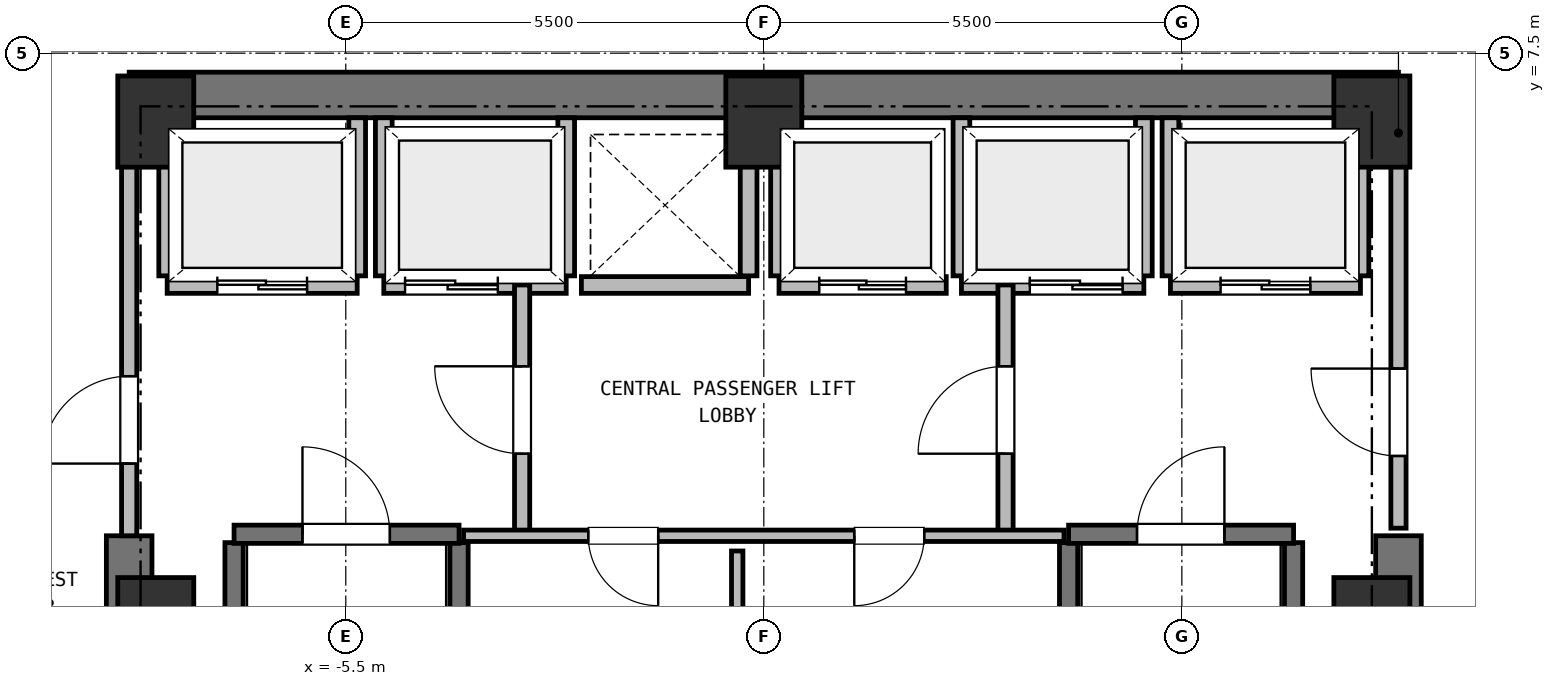
"""IFC4 building model, lengths in metres.
Left out: names, types, materials, properties, quantities, classifications, styles, units other than length and angle.
Written with IfcOpenShell. Run it as: python <this file> out.ifc"""

import sys

from ifc_helpers import new_model, si_unit, direction, frame, frame_2d, origin, origin_2d, place, context, subcontext, project, spatial, rectangle, extrude, element, fill, save


model = new_model("IFC4")
c1 = context("Model", 3, precision=1e-05, world=origin(), true_north=direction((0.0, 1.0)))
c2 = subcontext(c1, "Body", "Model", "MODEL_VIEW")
j1 = project(units=[si_unit("LENGTHUNIT", "METRE"), si_unit("PLANEANGLEUNIT", "RADIAN")], contexts=[c1])
p1 = place(None, origin())
s1 = spatial("IfcSite", under=j1, at=p1, CompositionType="ELEMENT")
p2 = place(p1, origin())
s2 = spatial("IfcBuilding", under=s1, at=p2, CompositionType="ELEMENT")
p3 = place(p2, frame((0.0, 0.0, 88.25)))
s3 = spatial("IfcBuildingStorey", under=s2, at=p3, CompositionType="ELEMENT", Elevation=88.25)
for number, where, z_axis, x_axis in (
    (1, (8.0, 0.0, 0.0), (0.0, 0.0, 1.0), (1.0, 0.0, 0.0)),
    (2, (8.0, 6.6, 0.0), (0.0, 0.0, 1.0), (1.0, 0.0, 0.0)),
    (3, (0.0, 6.6, 0.0), (0.0, 0.0, 1.0), (1.0, 0.0, 0.0)),
    (4, (-8.0, 6.6, 0.0), (0.0, 0.0, 1.0), (1.0, 0.0, 0.0)),
    (5, (-8.0, 0.0, 0.0), (0.0, 0.0, 1.0), (1.0, 0.0, 0.0)),
):
    element("IfcColumn", number, at=place(p3, frame(where, z_axis=z_axis, x_axis=x_axis)), inside=s3, PredefinedType="COLUMN", context=c2, shape_type="SweptSolid", body=[
        extrude(rectangle(XDim=1.0, YDim=1.2, at=origin_2d()), origin(), (0.0, 0.0, 1.0), 4.5),
    ])
p4 = place(p3, frame((-8.35, 6.95, 0.0), z_axis=(0.0, 0.0, 1.0), x_axis=(1.0, 0.0, 0.0)))
e6 = element("IfcWall", 6, at=p4, inside=s3, PredefinedType="SHEAR", context=c2, shape_type="SweptSolid", body=[
    extrude(rectangle(XDim=16.7, YDim=0.6, at=frame_2d((8.35, 0.0))), origin(), (0.0, 0.0, 1.0), 4.21),
])
for number, where, z_axis, x_axis in (
    (7, (-8.35, -6.95, 0.0), (0.0, 0.0, 1.0), (0.0, 1.0, 0.0)),
    (8, (8.35, -6.95, 0.0), (0.0, 0.0, 1.0), (0.0, 1.0, 0.0)),
):
    element("IfcWall", number, at=place(p3, frame(where, z_axis=z_axis, x_axis=x_axis)), inside=s3, PredefinedType="SHEAR", context=c2, shape_type="SweptSolid", body=[
        extrude(rectangle(XDim=8.1, YDim=0.6, at=frame_2d((4.05, 0.0))), origin(), (0.0, 0.0, 1.0), 4.21),
    ])
p5 = place(p3, frame((5.781, 14.192, 0.0), z_axis=(0.0, 0.0, 1.0), x_axis=(0.743145885754, -0.6691294288, 0.0)))
e9 = element("IfcWall", 9, at=p5, inside=s3, PredefinedType="SOLIDWALL", context=c2, shape_type="SweptSolid", body=[
    extrude(rectangle(XDim=10.4, YDim=0.36, at=frame_2d((5.2, 0.0))), origin(), (0.0, 0.0, 1.0), 4.21),
])
p6 = place(p5, frame((4.375, 0.0, 0.0)))
e10 = element("IfcOpeningElement", 10, at=p6, cuts=e9, PredefinedType="OPENING", context=c2, shape_type="SweptSolid", body=[
    extrude(rectangle(XDim=1.65, YDim=2.25, at=frame_2d((0.825, 1.125))), frame((0.0, 0.19, 0.0), z_axis=(0.0, -1.0, 0.0), x_axis=(1.0, 0.0, 0.0)), (0.0, 0.0, 1.0), 0.38),
])
for number, where, z_axis, x_axis in (
    (11, (-6.97, -6.16, 0.0), (0.0, 0.0, 1.0), (0.0, 1.0, 0.0)),
    (12, (-4.01, -6.16, 0.0), (0.0, 0.0, 1.0), (0.0, 1.0, 0.0)),
):
    element("IfcWall", number, at=place(p3, frame(where, z_axis=z_axis, x_axis=x_axis)), inside=s3, PredefinedType="SHEAR", context=c2, shape_type="SweptSolid", body=[
        extrude(rectangle(XDim=7.22, YDim=0.24, at=frame_2d((3.61, 0.0))), origin(), (0.0, 0.0, 1.0), 4.21),
    ])
p7 = place(p3, frame((-6.97, 1.17, 0.0), z_axis=(0.0, 0.0, 1.0), x_axis=(1.0, 0.0, 0.0)))
e13 = element("IfcWall", 13, at=p7, inside=s3, PredefinedType="SHEAR", context=c2, shape_type="SweptSolid", body=[
    extrude(rectangle(XDim=2.96, YDim=0.24, at=frame_2d((1.48, 0.0))), origin(), (0.0, 0.0, 1.0), 4.21),
])
p8 = place(p7, frame((0.9, 0.0, 0.0)))
e14 = element("IfcOpeningElement", 14, at=p8, cuts=e13, PredefinedType="OPENING", context=c2, shape_type="SweptSolid", body=[
    extrude(rectangle(XDim=1.15, YDim=2.15, at=frame_2d((0.575, 1.075))), frame((0.0, 0.13, 0.0), z_axis=(0.0, -1.0, 0.0), x_axis=(1.0, 0.0, 0.0)), (0.0, 0.0, 1.0), 0.26),
])
for number, where, z_axis, x_axis in (
    (15, (4.01, -6.16, 0.0), (0.0, 0.0, 1.0), (0.0, 1.0, 0.0)),
    (16, (6.97, -6.16, 0.0), (0.0, 0.0, 1.0), (0.0, 1.0, 0.0)),
):
    element("IfcWall", number, at=place(p3, frame(where, z_axis=z_axis, x_axis=x_axis)), inside=s3, PredefinedType="SHEAR", context=c2, shape_type="SweptSolid", body=[
        extrude(rectangle(XDim=7.22, YDim=0.24, at=frame_2d((3.61, 0.0))), origin(), (0.0, 0.0, 1.0), 4.21),
    ])
p9 = place(p3, frame((4.01, 1.17, 0.0), z_axis=(0.0, 0.0, 1.0), x_axis=(1.0, 0.0, 0.0)))
e17 = element("IfcWall", 17, at=p9, inside=s3, PredefinedType="SHEAR", context=c2, shape_type="SweptSolid", body=[
    extrude(rectangle(XDim=2.96, YDim=0.24, at=frame_2d((1.48, 0.0))), origin(), (0.0, 0.0, 1.0), 4.21),
])
p10 = place(p9, frame((0.9, 0.0, 0.0)))
e18 = element("IfcOpeningElement", 18, at=p10, cuts=e17, PredefinedType="OPENING", context=c2, shape_type="SweptSolid", body=[
    extrude(rectangle(XDim=1.15, YDim=2.15, at=frame_2d((0.575, 1.075))), frame((0.0, 0.13, 0.0), z_axis=(0.0, -1.0, 0.0), x_axis=(1.0, 0.0, 0.0)), (0.0, 0.0, 1.0), 0.26),
])
p11 = place(p3, frame((-7.85, 4.45, 0.0), z_axis=(0.0, 0.0, 1.0), x_axis=(1.0, 0.0, 0.0)))
e19 = element("IfcWall", 19, at=p11, inside=s3, PredefinedType="PARTITIONING", context=c2, shape_type="SweptSolid", body=[
    extrude(rectangle(XDim=2.5, YDim=0.22, at=frame_2d((1.25, 0.0))), origin(), (0.0, 0.0, 1.0), 4.21),
])
p12 = place(p11, frame((0.66, 0.0, 0.0)))
e20 = element("IfcOpeningElement", 20, at=p12, cuts=e19, PredefinedType="OPENING", context=c2, shape_type="SweptSolid", body=[
    extrude(rectangle(XDim=1.18, YDim=2.15, at=frame_2d((0.59, 1.075))), frame((0.0, 0.12, 0.0), z_axis=(0.0, -1.0, 0.0), x_axis=(1.0, 0.0, 0.0)), (0.0, 0.0, 1.0), 0.24),
])
p13 = place(p3, frame((-7.85, 4.57, 0.0), z_axis=(0.0, 0.0, 1.0), x_axis=(0.0, 1.0, 0.0)))
e21 = element("IfcWall", 21, at=p13, inside=s3, PredefinedType="PARTITIONING", context=c2, shape_type="SweptSolid", body=[
    extrude(rectangle(XDim=2.08, YDim=0.22, at=frame_2d((1.04, 0.0))), origin(), (0.0, 0.0, 1.0), 3.83),
])
p14 = place(p3, frame((-5.35, 4.57, 0.0), z_axis=(0.0, 0.0, 1.0), x_axis=(0.0, 1.0, 0.0)))
e22 = element("IfcWall", 22, at=p14, inside=s3, PredefinedType="PARTITIONING", context=c2, shape_type="SweptSolid", body=[
    extrude(rectangle(XDim=2.08, YDim=0.22, at=frame_2d((1.04, 0.0))), origin(), (0.0, 0.0, 1.0), 4.21),
])
p15 = place(p3, frame((5.35, 4.45, 0.0), z_axis=(0.0, 0.0, 1.0), x_axis=(1.0, 0.0, 0.0)))
e23 = element("IfcWall", 23, at=p15, inside=s3, PredefinedType="PARTITIONING", context=c2, shape_type="SweptSolid", body=[
    extrude(rectangle(XDim=2.5, YDim=0.22, at=frame_2d((1.25, 0.0))), origin(), (0.0, 0.0, 1.0), 4.21),
])
p16 = place(p15, frame((0.66, 0.0, 0.0)))
e24 = element("IfcOpeningElement", 24, at=p16, cuts=e23, PredefinedType="OPENING", context=c2, shape_type="SweptSolid", body=[
    extrude(rectangle(XDim=1.18, YDim=2.15, at=frame_2d((0.59, 1.075))), frame((0.0, 0.12, 0.0), z_axis=(0.0, -1.0, 0.0), x_axis=(1.0, 0.0, 0.0)), (0.0, 0.0, 1.0), 0.24),
])
p17 = place(p3, frame((5.35, 4.57, 0.0), z_axis=(0.0, 0.0, 1.0), x_axis=(0.0, 1.0, 0.0)))
e25 = element("IfcWall", 25, at=p17, inside=s3, PredefinedType="PARTITIONING", context=c2, shape_type="SweptSolid", body=[
    extrude(rectangle(XDim=2.08, YDim=0.22, at=frame_2d((1.04, 0.0))), origin(), (0.0, 0.0, 1.0), 4.21),
])
p18 = place(p3, frame((7.85, 4.57, 0.0), z_axis=(0.0, 0.0, 1.0), x_axis=(0.0, 1.0, 0.0)))
e26 = element("IfcWall", 26, at=p18, inside=s3, PredefinedType="PARTITIONING", context=c2, shape_type="SweptSolid", body=[
    extrude(rectangle(XDim=2.08, YDim=0.22, at=frame_2d((1.04, 0.0))), origin(), (0.0, 0.0, 1.0), 3.83),
])
p19 = place(p3, frame((-5.0, 4.45, 0.0), z_axis=(0.0, 0.0, 1.0), x_axis=(1.0, 0.0, 0.0)))
e27 = element("IfcWall", 27, at=p19, inside=s3, PredefinedType="PARTITIONING", context=c2, shape_type="SweptSolid", body=[
    extrude(rectangle(XDim=2.4, YDim=0.22, at=frame_2d((1.2, 0.0))), origin(), (0.0, 0.0, 1.0), 4.21),
])
p20 = place(p19, frame((0.28, 0.0, 0.0)))
e28 = element("IfcOpeningElement", 28, at=p20, cuts=e27, PredefinedType="OPENING", context=c2, shape_type="SweptSolid", body=[
    extrude(rectangle(XDim=1.22, YDim=2.15, at=frame_2d((0.61, 1.075))), frame((0.0, 0.12, 0.0), z_axis=(0.0, -1.0, 0.0), x_axis=(1.0, 0.0, 0.0)), (0.0, 0.0, 1.0), 0.24),
])
for number, where, z_axis, x_axis in (
    (29, (-5.0, 4.57, 0.0), (0.0, 0.0, 1.0), (0.0, 1.0, 0.0)),
    (30, (-2.6, 4.57, 0.0), (0.0, 0.0, 1.0), (0.0, 1.0, 0.0)),
):
    element("IfcWall", number, at=place(p3, frame(where, z_axis=z_axis, x_axis=x_axis)), inside=s3, PredefinedType="PARTITIONING", context=c2, shape_type="SweptSolid", body=[
        extrude(rectangle(XDim=2.08, YDim=0.22, at=frame_2d((1.04, 0.0))), origin(), (0.0, 0.0, 1.0), 4.21),
    ])
p21 = place(p3, frame((2.6, 4.45, 0.0), z_axis=(0.0, 0.0, 1.0), x_axis=(1.0, 0.0, 0.0)))
e31 = element("IfcWall", 31, at=p21, inside=s3, PredefinedType="PARTITIONING", context=c2, shape_type="SweptSolid", body=[
    extrude(rectangle(XDim=2.4, YDim=0.22, at=frame_2d((1.2, 0.0))), origin(), (0.0, 0.0, 1.0), 4.21),
])
p22 = place(p21, frame((0.9, 0.0, 0.0)))
e32 = element("IfcOpeningElement", 32, at=p22, cuts=e31, PredefinedType="OPENING", context=c2, shape_type="SweptSolid", body=[
    extrude(rectangle(XDim=1.22, YDim=2.15, at=frame_2d((0.61, 1.075))), frame((0.0, 0.12, 0.0), z_axis=(0.0, -1.0, 0.0), x_axis=(1.0, 0.0, 0.0)), (0.0, 0.0, 1.0), 0.24),
])
for number, where, z_axis, x_axis in (
    (33, (2.6, 4.57, 0.0), (0.0, 0.0, 1.0), (0.0, 1.0, 0.0)),
    (34, (5.0, 4.57, 0.0), (0.0, 0.0, 1.0), (0.0, 1.0, 0.0)),
):
    element("IfcWall", number, at=place(p3, frame(where, z_axis=z_axis, x_axis=x_axis)), inside=s3, PredefinedType="PARTITIONING", context=c2, shape_type="SweptSolid", body=[
        extrude(rectangle(XDim=2.08, YDim=0.22, at=frame_2d((1.04, 0.0))), origin(), (0.0, 0.0, 1.0), 4.21),
    ])
p23 = place(p3, frame((-2.4, 4.45, 0.0), z_axis=(0.0, 0.0, 1.0), x_axis=(1.0, 0.0, 0.0)))
e35 = element("IfcWall", 35, at=p23, inside=s3, PredefinedType="PARTITIONING", context=c2, shape_type="SweptSolid", body=[
    extrude(rectangle(XDim=2.2, YDim=0.22, at=frame_2d((1.1, 0.0))), origin(), (0.0, 0.0, 1.0), 4.21),
])
p24 = place(p3, frame((-0.2, 4.57, 0.0), z_axis=(0.0, 0.0, 1.0), x_axis=(0.0, 1.0, 0.0)))
e36 = element("IfcWall", 36, at=p24, inside=s3, PredefinedType="PARTITIONING", context=c2, shape_type="SweptSolid", body=[
    extrude(rectangle(XDim=2.08, YDim=0.22, at=frame_2d((1.04, 0.0))), origin(), (0.0, 0.0, 1.0), 4.21),
])
p25 = place(p3, frame((0.2, 4.45, 0.0), z_axis=(0.0, 0.0, 1.0), x_axis=(1.0, 0.0, 0.0)))
e37 = element("IfcWall", 37, at=p25, inside=s3, PredefinedType="PARTITIONING", context=c2, shape_type="SweptSolid", body=[
    extrude(rectangle(XDim=2.2, YDim=0.22, at=frame_2d((1.1, 0.0))), origin(), (0.0, 0.0, 1.0), 4.21),
])
p26 = place(p25, frame((0.53, 0.0, 0.0)))
e38 = element("IfcOpeningElement", 38, at=p26, cuts=e37, PredefinedType="OPENING", context=c2, shape_type="SweptSolid", body=[
    extrude(rectangle(XDim=1.14, YDim=2.15, at=frame_2d((0.57, 1.075))), frame((0.0, 0.12, 0.0), z_axis=(0.0, -1.0, 0.0), x_axis=(1.0, 0.0, 0.0)), (0.0, 0.0, 1.0), 0.24),
])
p27 = place(p3, frame((0.2, 4.57, 0.0), z_axis=(0.0, 0.0, 1.0), x_axis=(0.0, 1.0, 0.0)))
e39 = element("IfcWall", 39, at=p27, inside=s3, PredefinedType="PARTITIONING", context=c2, shape_type="SweptSolid", body=[
    extrude(rectangle(XDim=2.08, YDim=0.22, at=frame_2d((1.04, 0.0))), origin(), (0.0, 0.0, 1.0), 4.21),
])
p28 = place(p3, frame((-3.18, 1.15, 0.0), z_axis=(0.0, 0.0, 1.0), x_axis=(0.0, 1.0, 0.0)))
e40 = element("IfcWall", 40, at=p28, inside=s3, PredefinedType="PARTITIONING", context=c2, shape_type="SweptSolid", body=[
    extrude(rectangle(XDim=3.3, YDim=0.2, at=frame_2d((1.65, 0.0))), origin(), (0.0, 0.0, 1.0), 4.21),
])
p29 = place(p28, frame((1.08, 0.0, 0.0)))
e41 = element("IfcOpeningElement", 41, at=p29, cuts=e40, PredefinedType="OPENING", context=c2, shape_type="SweptSolid", body=[
    extrude(rectangle(XDim=1.15, YDim=2.15, at=frame_2d((0.575, 1.075))), frame((0.0, 0.11, 0.0), z_axis=(0.0, -1.0, 0.0), x_axis=(1.0, 0.0, 0.0)), (0.0, 0.0, 1.0), 0.22),
])
p30 = place(p3, frame((3.18, 1.15, 0.0), z_axis=(0.0, 0.0, 1.0), x_axis=(0.0, 1.0, 0.0)))
e42 = element("IfcWall", 42, at=p30, inside=s3, PredefinedType="PARTITIONING", context=c2, shape_type="SweptSolid", body=[
    extrude(rectangle(XDim=3.3, YDim=0.2, at=frame_2d((1.65, 0.0))), origin(), (0.0, 0.0, 1.0), 4.21),
])
p31 = place(p30, frame((1.08, 0.0, 0.0)))
e43 = element("IfcOpeningElement", 43, at=p31, cuts=e42, PredefinedType="OPENING", context=c2, shape_type="SweptSolid", body=[
    extrude(rectangle(XDim=1.15, YDim=2.15, at=frame_2d((0.575, 1.075))), frame((0.0, 0.11, 0.0), z_axis=(0.0, -1.0, 0.0), x_axis=(1.0, 0.0, 0.0)), (0.0, 0.0, 1.0), 0.22),
])
p32 = place(p3, frame((-8.35, 1.15, 0.0), z_axis=(0.0, 0.0, 1.0), x_axis=(0.0, 1.0, 0.0)))
e44 = element("IfcWall", 44, at=p32, inside=s3, PredefinedType="PARTITIONING", context=c2, shape_type="SweptSolid", body=[
    extrude(rectangle(XDim=5.4, YDim=0.2, at=frame_2d((2.7, 0.0))), origin(), (0.0, 0.0, 1.0), 4.21),
])
p33 = place(p32, frame((0.95, 0.0, 0.0)))
e45 = element("IfcOpeningElement", 45, at=p33, cuts=e44, PredefinedType="OPENING", context=c2, shape_type="SweptSolid", body=[
    extrude(rectangle(XDim=1.15, YDim=2.15, at=frame_2d((0.575, 1.075))), frame((0.0, 0.11, 0.0), z_axis=(0.0, -1.0, 0.0), x_axis=(1.0, 0.0, 0.0)), (0.0, 0.0, 1.0), 0.22),
])
p34 = place(p3, frame((8.35, 1.25, 0.0), z_axis=(0.0, 0.0, 1.0), x_axis=(0.0, 1.0, 0.0)))
e46 = element("IfcWall", 46, at=p34, inside=s3, PredefinedType="PARTITIONING", context=c2, shape_type="SweptSolid", body=[
    extrude(rectangle(XDim=5.3, YDim=0.2, at=frame_2d((2.65, 0.0))), origin(), (0.0, 0.0, 1.0), 4.21),
])
p35 = place(p34, frame((0.95, 0.0, 0.0)))
e47 = element("IfcOpeningElement", 47, at=p35, cuts=e46, PredefinedType="OPENING", context=c2, shape_type="SweptSolid", body=[
    extrude(rectangle(XDim=1.15, YDim=2.15, at=frame_2d((0.575, 1.075))), frame((0.0, 0.11, 0.0), z_axis=(0.0, -1.0, 0.0), x_axis=(1.0, 0.0, 0.0)), (0.0, 0.0, 1.0), 0.22),
])
p36 = place(p3, frame((3.95, 1.15, 0.0), z_axis=(0.0, 0.0, 1.0), x_axis=(-1.0, 0.0, 0.0)))
e48 = element("IfcWall", 48, at=p36, inside=s3, PredefinedType="PARTITIONING", context=c2, shape_type="SweptSolid", body=[
    extrude(rectangle(XDim=7.9, YDim=0.15, at=frame_2d((3.95, 0.0))), origin(), (0.0, 0.0, 1.0), 4.21),
])
p37 = place(p36, frame((5.34, 0.0, 0.0)))
e49 = element("IfcOpeningElement", 49, at=p37, cuts=e48, PredefinedType="OPENING", context=c2, shape_type="SweptSolid", body=[
    extrude(rectangle(XDim=0.92, YDim=2.05, at=frame_2d((0.46, 1.025))), frame((0.0, 0.085, 0.0), z_axis=(0.0, -1.0, 0.0), x_axis=(1.0, 0.0, 0.0)), (0.0, 0.0, 1.0), 0.17),
])
p38 = place(p36, frame((1.84, 0.0, 0.0)))
e50 = element("IfcOpeningElement", 50, at=p38, cuts=e48, PredefinedType="OPENING", context=c2, shape_type="SweptSolid", body=[
    extrude(rectangle(XDim=0.92, YDim=2.05, at=frame_2d((0.46, 1.025))), frame((0.0, 0.085, 0.0), z_axis=(0.0, -1.0, 0.0), x_axis=(1.0, 0.0, 0.0)), (0.0, 0.0, 1.0), 0.17),
])
p39 = place(p3, frame((-0.35, -1.73, 0.0), z_axis=(0.0, 0.0, 1.0), x_axis=(0.0, 1.0, 0.0)))
e51 = element("IfcWall", 51, at=p39, inside=s3, PredefinedType="PARTITIONING", context=c2, shape_type="SweptSolid", body=[
    extrude(rectangle(XDim=2.68, YDim=0.15, at=frame_2d((1.34, 0.0))), origin(), (0.0, 0.0, 1.0), 4.21),
])
for number, where, z_axis, x_axis in (
    (52, (8.578, 9.352, 0.0), (0.0, 0.0, 1.0), (0.707, -0.707, 0.0)),
    (53, (-10.752, 7.178, 0.0), (0.0, 0.0, 1.0), (0.707, 0.707, 0.0)),
):
    element("IfcWall", number, at=place(p3, frame(where, z_axis=z_axis, x_axis=x_axis)), inside=s3, PredefinedType="PARTITIONING", context=c2, shape_type="SweptSolid", body=[
        extrude(rectangle(XDim=3.074, YDim=0.15, at=frame_2d((1.537, 0.0))), origin(), (0.0, 0.0, 1.0), 4.21),
    ])
p40 = place(p8, origin())
e54 = element("IfcDoor", 54, at=p40, inside=s3, OperationType="SINGLE_SWING_LEFT", PredefinedType="DOOR", context=c2, shape_type="SweptSolid", body=[
    extrude(rectangle(XDim=1.15, YDim=2.15, at=frame_2d((0.575, 1.075))), frame((0.0, 0.025, 0.0), z_axis=(0.0, -1.0, 0.0), x_axis=(1.0, 0.0, 0.0)), (0.0, 0.0, 1.0), 0.05),
])
fill(e14, e54)
p41 = place(p10, origin())
e55 = element("IfcDoor", 55, at=p41, inside=s3, OperationType="SINGLE_SWING_RIGHT", PredefinedType="DOOR", context=c2, shape_type="SweptSolid", body=[
    extrude(rectangle(XDim=1.15, YDim=2.15, at=frame_2d((0.575, 1.075))), frame((0.0, 0.025, 0.0), z_axis=(0.0, -1.0, 0.0), x_axis=(1.0, 0.0, 0.0)), (0.0, 0.0, 1.0), 0.05),
])
fill(e18, e55)
p42 = place(p12, origin())
e56 = element("IfcDoor", 56, at=p42, inside=s3, OperationType="DOUBLE_DOOR_SLIDING", PredefinedType="DOOR", context=c2, shape_type="SweptSolid", body=[
    extrude(rectangle(XDim=1.18, YDim=2.15, at=frame_2d((0.59, 1.075))), frame((0.0, 0.025, 0.0), z_axis=(0.0, -1.0, 0.0), x_axis=(1.0, 0.0, 0.0)), (0.0, 0.0, 1.0), 0.05),
])
fill(e20, e56)
p43 = place(p16, origin())
e57 = element("IfcDoor", 57, at=p43, inside=s3, OperationType="DOUBLE_DOOR_SLIDING", PredefinedType="DOOR", context=c2, shape_type="SweptSolid", body=[
    extrude(rectangle(XDim=1.18, YDim=2.15, at=frame_2d((0.59, 1.075))), frame((0.0, 0.025, 0.0), z_axis=(0.0, -1.0, 0.0), x_axis=(1.0, 0.0, 0.0)), (0.0, 0.0, 1.0), 0.05),
])
fill(e24, e57)
p44 = place(p20, origin())
e58 = element("IfcDoor", 58, at=p44, inside=s3, OperationType="DOUBLE_DOOR_SLIDING", PredefinedType="DOOR", context=c2, shape_type="SweptSolid", body=[
    extrude(rectangle(XDim=1.22, YDim=2.15, at=frame_2d((0.61, 1.075))), frame((0.0, 0.025, 0.0), z_axis=(0.0, -1.0, 0.0), x_axis=(1.0, 0.0, 0.0)), (0.0, 0.0, 1.0), 0.05),
])
fill(e28, e58)
p45 = place(p22, origin())
e59 = element("IfcDoor", 59, at=p45, inside=s3, OperationType="DOUBLE_DOOR_SLIDING", PredefinedType="DOOR", context=c2, shape_type="SweptSolid", body=[
    extrude(rectangle(XDim=1.22, YDim=2.15, at=frame_2d((0.61, 1.075))), frame((0.0, 0.025, 0.0), z_axis=(0.0, -1.0, 0.0), x_axis=(1.0, 0.0, 0.0)), (0.0, 0.0, 1.0), 0.05),
])
fill(e32, e59)
p46 = place(p26, origin())
e60 = element("IfcDoor", 60, at=p46, inside=s3, OperationType="DOUBLE_DOOR_SLIDING", PredefinedType="DOOR", context=c2, shape_type="SweptSolid", body=[
    extrude(rectangle(XDim=1.14, YDim=2.15, at=frame_2d((0.57, 1.075))), frame((0.0, 0.025, 0.0), z_axis=(0.0, -1.0, 0.0), x_axis=(1.0, 0.0, 0.0)), (0.0, 0.0, 1.0), 0.05),
])
fill(e38, e60)
p47 = place(p29, origin())
e61 = element("IfcDoor", 61, at=p47, inside=s3, OperationType="SINGLE_SWING_RIGHT", PredefinedType="DOOR", context=c2, shape_type="SweptSolid", body=[
    extrude(rectangle(XDim=1.15, YDim=2.15, at=frame_2d((0.575, 1.075))), frame((0.0, 0.025, 0.0), z_axis=(0.0, -1.0, 0.0), x_axis=(1.0, 0.0, 0.0)), (0.0, 0.0, 1.0), 0.05),
])
fill(e41, e61)
p48 = place(p31, origin())
e62 = element("IfcDoor", 62, at=p48, inside=s3, OperationType="SINGLE_SWING_LEFT", PredefinedType="DOOR", context=c2, shape_type="SweptSolid", body=[
    extrude(rectangle(XDim=1.15, YDim=2.15, at=frame_2d((0.575, 1.075))), frame((0.0, 0.025, 0.0), z_axis=(0.0, -1.0, 0.0), x_axis=(1.0, 0.0, 0.0)), (0.0, 0.0, 1.0), 0.05),
])
fill(e43, e62)
p49 = place(p33, origin())
e63 = element("IfcDoor", 63, at=p49, inside=s3, OperationType="SINGLE_SWING_LEFT", PredefinedType="DOOR", context=c2, shape_type="SweptSolid", body=[
    extrude(rectangle(XDim=1.15, YDim=2.15, at=frame_2d((0.575, 1.075))), frame((0.0, 0.025, 0.0), z_axis=(0.0, -1.0, 0.0), x_axis=(1.0, 0.0, 0.0)), (0.0, 0.0, 1.0), 0.05),
])
fill(e45, e63)
p50 = place(p35, origin())
e64 = element("IfcDoor", 64, at=p50, inside=s3, OperationType="SINGLE_SWING_RIGHT", PredefinedType="DOOR", context=c2, shape_type="SweptSolid", body=[
    extrude(rectangle(XDim=1.15, YDim=2.15, at=frame_2d((0.575, 1.075))), frame((0.0, 0.025, 0.0), z_axis=(0.0, -1.0, 0.0), x_axis=(1.0, 0.0, 0.0)), (0.0, 0.0, 1.0), 0.05),
])
fill(e47, e64)
p51 = place(p37, origin())
e65 = element("IfcDoor", 65, at=p51, inside=s3, OperationType="SINGLE_SWING_LEFT", PredefinedType="DOOR", context=c2, shape_type="SweptSolid", body=[
    extrude(rectangle(XDim=0.92, YDim=2.05, at=frame_2d((0.46, 1.025))), frame((0.0, 0.025, 0.0), z_axis=(0.0, -1.0, 0.0), x_axis=(1.0, 0.0, 0.0)), (0.0, 0.0, 1.0), 0.05),
])
fill(e49, e65)
p52 = place(p38, origin())
e66 = element("IfcDoor", 66, at=p52, inside=s3, OperationType="SINGLE_SWING_RIGHT", PredefinedType="DOOR", context=c2, shape_type="SweptSolid", body=[
    extrude(rectangle(XDim=0.92, YDim=2.05, at=frame_2d((0.46, 1.025))), frame((0.0, 0.025, 0.0), z_axis=(0.0, -1.0, 0.0), x_axis=(1.0, 0.0, 0.0)), (0.0, 0.0, 1.0), 0.05),
])
fill(e50, e66)
save(model, sys.argv[1])
